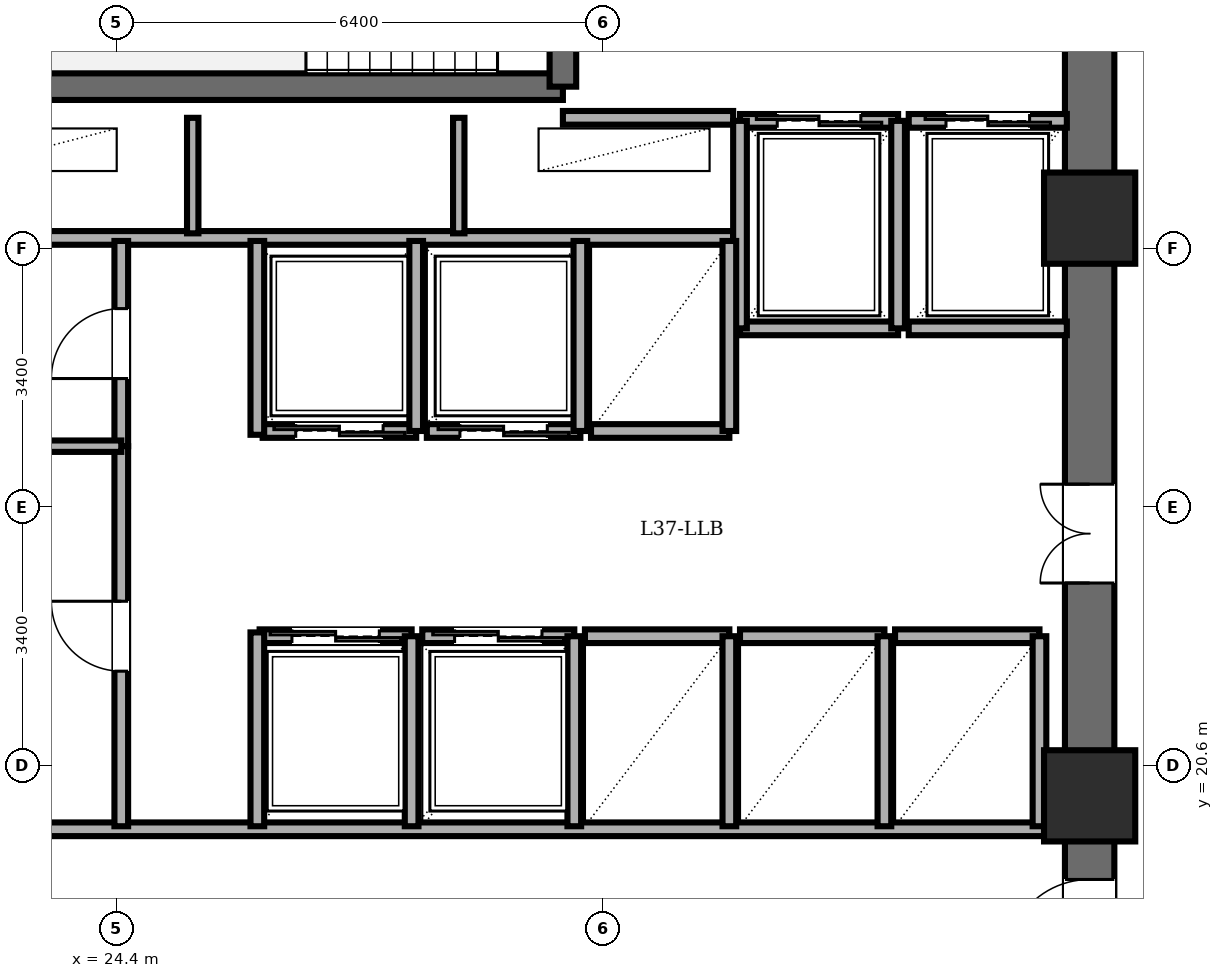
"""IFC4 building model, lengths in metres.
Left out: names, types, materials, properties, quantities, classifications, styles, units other than length and angle.
Written with IfcOpenShell. Run it as: python <this file> out.ifc"""

import sys

from ifc_helpers import new_model, si_unit, direction, frame, frame_2d, origin, origin_2d, place, context, subcontext, project, spatial, rectangle, extrude, element, fill, save


model = new_model("IFC4")
c1 = context("Model", 3, precision=1e-05, world=origin(), true_north=direction((0.0, 1.0)))
c2 = subcontext(c1, "Body", "Model", "MODEL_VIEW")
j1 = project(units=[si_unit("LENGTHUNIT", "METRE"), si_unit("PLANEANGLEUNIT", "RADIAN")], contexts=[c1])
p1 = place(None, origin())
s1 = spatial("IfcSite", under=j1, at=p1, CompositionType="ELEMENT")
p2 = place(p1, origin())
s2 = spatial("IfcBuilding", under=s1, at=p2, CompositionType="ELEMENT")
p3 = place(p2, frame((0.0, 0.0, 143.8)))
s3 = spatial("IfcBuildingStorey", under=s2, at=p3, CompositionType="ELEMENT", Elevation=143.8)
for number, where, z_axis, x_axis in (
    (1, (37.2, 20.2, 0.0), (0.0, 0.0, 1.0), (1.0, 0.0, 0.0)),
    (2, (37.2, 27.8, 0.0), (0.0, 0.0, 1.0), (1.0, 0.0, 0.0)),
):
    element("IfcColumn", number, at=place(p3, frame(where, z_axis=z_axis, x_axis=x_axis)), inside=s3, PredefinedType="COLUMN", context=c2, shape_type="SweptSolid", body=[
        extrude(rectangle(XDim=1.2, YDim=1.2, at=origin_2d()), origin(), (0.0, 0.0, 1.0), 3.6),
    ])
p4 = place(p3, frame((37.2, 14.4, 0.0), z_axis=(0.0, 0.0, 1.0), x_axis=(0.0, 1.0, 0.0)))
e3 = element("IfcWall", 3, at=p4, inside=s3, PredefinedType="SHEAR", context=c2, shape_type="SweptSolid", body=[
    extrude(rectangle(XDim=19.2, YDim=0.65, at=frame_2d((9.6, 0.0))), origin(), (0.0, 0.0, 1.0), 3.4),
])
p5 = place(p4, frame((15.8, 0.0, 0.0)))
e4 = element("IfcOpeningElement", 4, at=p5, cuts=e3, PredefinedType="OPENING", context=c2, shape_type="SweptSolid", body=[
    extrude(rectangle(XDim=1.15, YDim=2.15, at=frame_2d((0.575, 1.075))), frame((0.0, 0.335, 0.0), z_axis=(0.0, -1.0, 0.0), x_axis=(1.0, 0.0, 0.0)), (0.0, 0.0, 1.0), 0.67),
])
p6 = place(p4, frame((3.6, 0.0, 0.0)))
e5 = element("IfcOpeningElement", 5, at=p6, cuts=e3, PredefinedType="OPENING", context=c2, shape_type="SweptSolid", body=[
    extrude(rectangle(XDim=1.1, YDim=2.15, at=frame_2d((0.55, 1.075))), frame((0.0, 0.335, 0.0), z_axis=(0.0, -1.0, 0.0), x_axis=(1.0, 0.0, 0.0)), (0.0, 0.0, 1.0), 0.67),
])
p7 = place(p4, frame((8.6, 0.0, 0.0)))
e6 = element("IfcOpeningElement", 6, at=p7, cuts=e3, PredefinedType="OPENING", context=c2, shape_type="SweptSolid", body=[
    extrude(rectangle(XDim=1.3, YDim=2.2, at=frame_2d((0.65, 1.1))), frame((0.0, 0.335, 0.0), z_axis=(0.0, -1.0, 0.0), x_axis=(1.0, 0.0, 0.0)), (0.0, 0.0, 1.0), 0.67),
])
p8 = place(p3, frame((22.48, 29.53, 0.0), z_axis=(0.0, 0.0, 1.0), x_axis=(1.0, 0.0, 0.0)))
e7 = element("IfcWall", 7, at=p8, inside=s3, PredefinedType="SOLIDWALL", context=c2, shape_type="SweptSolid", body=[
    extrude(rectangle(XDim=7.79, YDim=0.35, at=frame_2d((3.895, 0.0))), origin(), (0.0, 0.0, 1.0), 3.4),
])
p9 = place(p3, frame((30.27, 29.53, 0.0), z_axis=(0.0, 0.0, 1.0), x_axis=(0.0, 1.0, 0.0)))
e8 = element("IfcWall", 8, at=p9, inside=s3, PredefinedType="SOLIDWALL", context=c2, shape_type="SweptSolid", body=[
    extrude(rectangle(XDim=3.58, YDim=0.35, at=frame_2d((1.79, 0.0))), origin(), (0.0, 0.0, 1.0), 3.4),
])
p10 = place(p9, frame((1.25, 0.0, 0.0)))
e9 = element("IfcOpeningElement", 9, at=p10, cuts=e8, PredefinedType="OPENING", context=c2, shape_type="SweptSolid", body=[
    extrude(rectangle(XDim=1.1, YDim=2.15, at=frame_2d((0.55, 1.075))), frame((0.0, 0.185, 0.0), z_axis=(0.0, -1.0, 0.0), x_axis=(1.0, 0.0, 0.0)), (0.0, 0.0, 1.0), 0.37),
])
p11 = place(p3, frame((30.27, 29.12, 0.0), z_axis=(0.0, 0.0, 1.0), x_axis=(1.0, 0.0, 0.0)))
e10 = element("IfcWall", 10, at=p11, inside=s3, PredefinedType="PARTITIONING", context=c2, shape_type="SweptSolid", body=[
    extrude(rectangle(XDim=2.24, YDim=0.18, at=frame_2d((1.12, 0.0))), origin(), (0.0, 0.0, 1.0), 3.4),
])
p12 = place(p3, frame((21.95, 27.54, 0.0), z_axis=(0.0, 0.0, 1.0), x_axis=(1.0, 0.0, 0.0)))
e11 = element("IfcWall", 11, at=p12, inside=s3, PredefinedType="PARTITIONING", context=c2, shape_type="SweptSolid", body=[
    extrude(rectangle(XDim=10.56, YDim=0.18, at=frame_2d((5.28, 0.0))), origin(), (0.0, 0.0, 1.0), 3.4),
])
for number, where, z_axis, x_axis in (
    (12, (25.4, 27.6, 0.0), (0.0, 0.0, 1.0), (0.0, 1.0, 0.0)),
    (13, (28.9, 27.6, 0.0), (0.0, 0.0, 1.0), (0.0, 1.0, 0.0)),
):
    element("IfcWall", number, at=place(p3, frame(where, z_axis=z_axis, x_axis=x_axis)), inside=s3, PredefinedType="PARTITIONING", context=c2, shape_type="SweptSolid", body=[
        extrude(rectangle(XDim=1.52, YDim=0.15, at=frame_2d((0.76, 0.0))), origin(), (0.0, 0.0, 1.0), 3.4),
    ])
p13 = place(p3, frame((21.95, 19.76, 0.0), z_axis=(0.0, 0.0, 1.0), x_axis=(1.0, 0.0, 0.0)))
e14 = element("IfcWall", 14, at=p13, inside=s3, PredefinedType="PARTITIONING", context=c2, shape_type="SweptSolid", body=[
    extrude(rectangle(XDim=14.87, YDim=0.18, at=frame_2d((7.435, 0.0))), origin(), (0.0, 0.0, 1.0), 3.4),
])
p14 = place(p3, frame((32.6, 29.08, 0.0), z_axis=(0.0, 0.0, 1.0), x_axis=(1.0, 0.0, 0.0)))
e15 = element("IfcWall", 15, at=p14, inside=s3, PredefinedType="PARTITIONING", context=c2, shape_type="SweptSolid", body=[
    extrude(rectangle(XDim=2.08, YDim=0.18, at=frame_2d((1.04, 0.0))), origin(), (0.0, 0.0, 1.0), 3.4),
])
p15 = place(p14, frame((0.49, 0.0, 0.0)))
e16 = element("IfcOpeningElement", 16, at=p15, cuts=e15, PredefinedType="OPENING", context=c2, shape_type="SweptSolid", body=[
    extrude(rectangle(XDim=1.1, YDim=2.2, at=frame_2d((0.55, 1.1))), frame((0.0, 0.1, 0.0), z_axis=(0.0, -1.0, 0.0), x_axis=(1.0, 0.0, 0.0)), (0.0, 0.0, 1.0), 0.2),
])
p16 = place(p3, frame((34.68, 26.35, 0.0), z_axis=(0.0, 0.0, 1.0), x_axis=(-1.0, 0.0, 0.0)))
e17 = element("IfcWall", 17, at=p16, inside=s3, PredefinedType="PARTITIONING", context=c2, shape_type="SweptSolid", body=[
    extrude(rectangle(XDim=2.08, YDim=0.18, at=frame_2d((1.04, 0.0))), origin(), (0.0, 0.0, 1.0), 3.4),
])
for number, where, z_axis, x_axis in (
    (18, (34.68, 26.35, 0.0), (0.0, 0.0, 1.0), (0.0, 1.0, 0.0)),
    (19, (32.6, 29.08, 0.0), (0.0, 0.0, 1.0), (0.0, -1.0, 0.0)),
):
    element("IfcWall", number, at=place(p3, frame(where, z_axis=z_axis, x_axis=x_axis)), inside=s3, PredefinedType="PARTITIONING", context=c2, shape_type="SweptSolid", body=[
        extrude(rectangle(XDim=2.73, YDim=0.18, at=frame_2d((1.365, 0.0))), origin(), (0.0, 0.0, 1.0), 3.4),
    ])
p17 = place(p3, frame((34.82, 29.08, 0.0), z_axis=(0.0, 0.0, 1.0), x_axis=(1.0, 0.0, 0.0)))
e20 = element("IfcWall", 20, at=p17, inside=s3, PredefinedType="PARTITIONING", context=c2, shape_type="SweptSolid", body=[
    extrude(rectangle(XDim=2.08, YDim=0.18, at=frame_2d((1.04, 0.0))), origin(), (0.0, 0.0, 1.0), 3.4),
])
p18 = place(p17, frame((0.49, 0.0, 0.0)))
e21 = element("IfcOpeningElement", 21, at=p18, cuts=e20, PredefinedType="OPENING", context=c2, shape_type="SweptSolid", body=[
    extrude(rectangle(XDim=1.1, YDim=2.2, at=frame_2d((0.55, 1.1))), frame((0.0, 0.1, 0.0), z_axis=(0.0, -1.0, 0.0), x_axis=(1.0, 0.0, 0.0)), (0.0, 0.0, 1.0), 0.2),
])
p19 = place(p3, frame((36.9, 26.35, 0.0), z_axis=(0.0, 0.0, 1.0), x_axis=(-1.0, 0.0, 0.0)))
e22 = element("IfcWall", 22, at=p19, inside=s3, PredefinedType="PARTITIONING", context=c2, shape_type="SweptSolid", body=[
    extrude(rectangle(XDim=2.08, YDim=0.18, at=frame_2d((1.04, 0.0))), origin(), (0.0, 0.0, 1.0), 3.4),
])
p20 = place(p3, frame((28.34, 25.0, 0.0), z_axis=(0.0, 0.0, 1.0), x_axis=(-1.0, 0.0, 0.0)))
e23 = element("IfcWall", 23, at=p20, inside=s3, PredefinedType="PARTITIONING", context=c2, shape_type="SweptSolid", body=[
    extrude(rectangle(XDim=2.02, YDim=0.18, at=frame_2d((1.01, 0.0))), origin(), (0.0, 0.0, 1.0), 3.4),
])
p21 = place(p20, frame((0.435, 0.0, 0.0)))
e24 = element("IfcOpeningElement", 24, at=p21, cuts=e23, PredefinedType="OPENING", context=c2, shape_type="SweptSolid", body=[
    extrude(rectangle(XDim=1.15, YDim=2.2, at=frame_2d((0.575, 1.1))), frame((0.0, 0.1, 0.0), z_axis=(0.0, -1.0, 0.0), x_axis=(1.0, 0.0, 0.0)), (0.0, 0.0, 1.0), 0.2),
])
p22 = place(p3, frame((28.34, 25.0, 0.0), z_axis=(0.0, 0.0, 1.0), x_axis=(0.0, 1.0, 0.0)))
e25 = element("IfcWall", 25, at=p22, inside=s3, PredefinedType="PARTITIONING", context=c2, shape_type="SweptSolid", body=[
    extrude(rectangle(XDim=2.5, YDim=0.18, at=frame_2d((1.25, 0.0))), origin(), (0.0, 0.0, 1.0), 3.4),
])
p23 = place(p3, frame((30.5, 25.0, 0.0), z_axis=(0.0, 0.0, 1.0), x_axis=(-1.0, 0.0, 0.0)))
e26 = element("IfcWall", 26, at=p23, inside=s3, PredefinedType="PARTITIONING", context=c2, shape_type="SweptSolid", body=[
    extrude(rectangle(XDim=2.02, YDim=0.18, at=frame_2d((1.01, 0.0))), origin(), (0.0, 0.0, 1.0), 3.4),
])
p24 = place(p23, frame((0.435, 0.0, 0.0)))
e27 = element("IfcOpeningElement", 27, at=p24, cuts=e26, PredefinedType="OPENING", context=c2, shape_type="SweptSolid", body=[
    extrude(rectangle(XDim=1.15, YDim=2.2, at=frame_2d((0.575, 1.1))), frame((0.0, 0.1, 0.0), z_axis=(0.0, -1.0, 0.0), x_axis=(1.0, 0.0, 0.0)), (0.0, 0.0, 1.0), 0.2),
])
p25 = place(p3, frame((30.5, 25.0, 0.0), z_axis=(0.0, 0.0, 1.0), x_axis=(0.0, 1.0, 0.0)))
e28 = element("IfcWall", 28, at=p25, inside=s3, PredefinedType="PARTITIONING", context=c2, shape_type="SweptSolid", body=[
    extrude(rectangle(XDim=2.5, YDim=0.18, at=frame_2d((1.25, 0.0))), origin(), (0.0, 0.0, 1.0), 3.4),
])
p26 = place(p3, frame((26.28, 22.3, 0.0), z_axis=(0.0, 0.0, 1.0), x_axis=(1.0, 0.0, 0.0)))
e29 = element("IfcWall", 29, at=p26, inside=s3, PredefinedType="PARTITIONING", context=c2, shape_type="SweptSolid", body=[
    extrude(rectangle(XDim=2.0, YDim=0.18, at=frame_2d((1.0, 0.0))), origin(), (0.0, 0.0, 1.0), 3.4),
])
p27 = place(p26, frame((0.425, 0.0, 0.0)))
e30 = element("IfcOpeningElement", 30, at=p27, cuts=e29, PredefinedType="OPENING", context=c2, shape_type="SweptSolid", body=[
    extrude(rectangle(XDim=1.15, YDim=2.2, at=frame_2d((0.575, 1.1))), frame((0.0, 0.1, 0.0), z_axis=(0.0, -1.0, 0.0), x_axis=(1.0, 0.0, 0.0)), (0.0, 0.0, 1.0), 0.2),
])
p28 = place(p3, frame((28.28, 19.8, 0.0), z_axis=(0.0, 0.0, 1.0), x_axis=(0.0, 1.0, 0.0)))
e31 = element("IfcWall", 31, at=p28, inside=s3, PredefinedType="PARTITIONING", context=c2, shape_type="SweptSolid", body=[
    extrude(rectangle(XDim=2.5, YDim=0.18, at=frame_2d((1.25, 0.0))), origin(), (0.0, 0.0, 1.0), 3.4),
])
p29 = place(p3, frame((28.42, 22.3, 0.0), z_axis=(0.0, 0.0, 1.0), x_axis=(1.0, 0.0, 0.0)))
e32 = element("IfcWall", 32, at=p29, inside=s3, PredefinedType="PARTITIONING", context=c2, shape_type="SweptSolid", body=[
    extrude(rectangle(XDim=2.0, YDim=0.18, at=frame_2d((1.0, 0.0))), origin(), (0.0, 0.0, 1.0), 3.4),
])
p30 = place(p29, frame((0.425, 0.0, 0.0)))
e33 = element("IfcOpeningElement", 33, at=p30, cuts=e32, PredefinedType="OPENING", context=c2, shape_type="SweptSolid", body=[
    extrude(rectangle(XDim=1.15, YDim=2.2, at=frame_2d((0.575, 1.1))), frame((0.0, 0.1, 0.0), z_axis=(0.0, -1.0, 0.0), x_axis=(1.0, 0.0, 0.0)), (0.0, 0.0, 1.0), 0.2),
])
p31 = place(p3, frame((30.42, 19.8, 0.0), z_axis=(0.0, 0.0, 1.0), x_axis=(0.0, 1.0, 0.0)))
e34 = element("IfcWall", 34, at=p31, inside=s3, PredefinedType="PARTITIONING", context=c2, shape_type="SweptSolid", body=[
    extrude(rectangle(XDim=2.5, YDim=0.18, at=frame_2d((1.25, 0.0))), origin(), (0.0, 0.0, 1.0), 3.4),
])
p32 = place(p3, frame((32.46, 25.0, 0.0), z_axis=(0.0, 0.0, 1.0), x_axis=(-1.0, 0.0, 0.0)))
e35 = element("IfcWall", 35, at=p32, inside=s3, PredefinedType="PARTITIONING", context=c2, shape_type="SweptSolid", body=[
    extrude(rectangle(XDim=1.82, YDim=0.18, at=frame_2d((0.91, 0.0))), origin(), (0.0, 0.0, 1.0), 3.4),
])
p33 = place(p3, frame((32.46, 25.0, 0.0), z_axis=(0.0, 0.0, 1.0), x_axis=(0.0, 1.0, 0.0)))
e36 = element("IfcWall", 36, at=p33, inside=s3, PredefinedType="PARTITIONING", context=c2, shape_type="SweptSolid", body=[
    extrude(rectangle(XDim=2.5, YDim=0.18, at=frame_2d((1.25, 0.0))), origin(), (0.0, 0.0, 1.0), 3.4),
])
p34 = place(p3, frame((30.56, 22.3, 0.0), z_axis=(0.0, 0.0, 1.0), x_axis=(1.0, 0.0, 0.0)))
e37 = element("IfcWall", 37, at=p34, inside=s3, PredefinedType="PARTITIONING", context=c2, shape_type="SweptSolid", body=[
    extrude(rectangle(XDim=1.9, YDim=0.18, at=frame_2d((0.95, 0.0))), origin(), (0.0, 0.0, 1.0), 3.4),
])
p35 = place(p3, frame((32.46, 19.8, 0.0), z_axis=(0.0, 0.0, 1.0), x_axis=(0.0, 1.0, 0.0)))
e38 = element("IfcWall", 38, at=p35, inside=s3, PredefinedType="PARTITIONING", context=c2, shape_type="SweptSolid", body=[
    extrude(rectangle(XDim=2.5, YDim=0.18, at=frame_2d((1.25, 0.0))), origin(), (0.0, 0.0, 1.0), 3.4),
])
p36 = place(p3, frame((32.6, 22.3, 0.0), z_axis=(0.0, 0.0, 1.0), x_axis=(1.0, 0.0, 0.0)))
e39 = element("IfcWall", 39, at=p36, inside=s3, PredefinedType="PARTITIONING", context=c2, shape_type="SweptSolid", body=[
    extrude(rectangle(XDim=1.9, YDim=0.18, at=frame_2d((0.95, 0.0))), origin(), (0.0, 0.0, 1.0), 3.4),
])
p37 = place(p3, frame((34.5, 19.8, 0.0), z_axis=(0.0, 0.0, 1.0), x_axis=(0.0, 1.0, 0.0)))
e40 = element("IfcWall", 40, at=p37, inside=s3, PredefinedType="PARTITIONING", context=c2, shape_type="SweptSolid", body=[
    extrude(rectangle(XDim=2.5, YDim=0.18, at=frame_2d((1.25, 0.0))), origin(), (0.0, 0.0, 1.0), 3.4),
])
p38 = place(p3, frame((34.64, 22.3, 0.0), z_axis=(0.0, 0.0, 1.0), x_axis=(1.0, 0.0, 0.0)))
e41 = element("IfcWall", 41, at=p38, inside=s3, PredefinedType="PARTITIONING", context=c2, shape_type="SweptSolid", body=[
    extrude(rectangle(XDim=1.9, YDim=0.18, at=frame_2d((0.95, 0.0))), origin(), (0.0, 0.0, 1.0), 3.4),
])
p39 = place(p3, frame((36.54, 19.8, 0.0), z_axis=(0.0, 0.0, 1.0), x_axis=(0.0, 1.0, 0.0)))
e42 = element("IfcWall", 42, at=p39, inside=s3, PredefinedType="PARTITIONING", context=c2, shape_type="SweptSolid", body=[
    extrude(rectangle(XDim=2.5, YDim=0.18, at=frame_2d((1.25, 0.0))), origin(), (0.0, 0.0, 1.0), 3.4),
])
p40 = place(p3, frame((24.46, 24.8, 0.0), z_axis=(0.0, 0.0, 1.0), x_axis=(0.0, 1.0, 0.0)))
e43 = element("IfcWall", 43, at=p40, inside=s3, PredefinedType="PARTITIONING", context=c2, shape_type="SweptSolid", body=[
    extrude(rectangle(XDim=2.7, YDim=0.18, at=frame_2d((1.35, 0.0))), origin(), (0.0, 0.0, 1.0), 3.4),
])
p41 = place(p40, frame((0.89, 0.0, 0.0)))
e44 = element("IfcOpeningElement", 44, at=p41, cuts=e43, PredefinedType="OPENING", context=c2, shape_type="SweptSolid", body=[
    extrude(rectangle(XDim=0.92, YDim=2.1, at=frame_2d((0.46, 1.05))), frame((0.0, 0.1, 0.0), z_axis=(0.0, -1.0, 0.0), x_axis=(1.0, 0.0, 0.0)), (0.0, 0.0, 1.0), 0.2),
])
p42 = place(p3, frame((24.46, 19.8, 0.0), z_axis=(0.0, 0.0, 1.0), x_axis=(0.0, 1.0, 0.0)))
e45 = element("IfcWall", 45, at=p42, inside=s3, PredefinedType="PARTITIONING", context=c2, shape_type="SweptSolid", body=[
    extrude(rectangle(XDim=5.0, YDim=0.18, at=frame_2d((2.5, 0.0))), origin(), (0.0, 0.0, 1.0), 3.4),
])
p43 = place(p42, frame((2.04, 0.0, 0.0)))
e46 = element("IfcOpeningElement", 46, at=p43, cuts=e45, PredefinedType="OPENING", context=c2, shape_type="SweptSolid", body=[
    extrude(rectangle(XDim=0.92, YDim=2.1, at=frame_2d((0.46, 1.05))), frame((0.0, 0.1, 0.0), z_axis=(0.0, -1.0, 0.0), x_axis=(1.0, 0.0, 0.0)), (0.0, 0.0, 1.0), 0.2),
])
p44 = place(p3, frame((21.95, 24.8, 0.0), z_axis=(0.0, 0.0, 1.0), x_axis=(1.0, 0.0, 0.0)))
e47 = element("IfcWall", 47, at=p44, inside=s3, PredefinedType="PARTITIONING", context=c2, shape_type="SweptSolid", body=[
    extrude(rectangle(XDim=2.51, YDim=0.15, at=frame_2d((1.255, 0.0))), origin(), (0.0, 0.0, 1.0), 3.4),
])
for number, where, z_axis, x_axis in (
    (48, (26.25, 24.95, 0.0), (0.0, 0.0, 1.0), (0.0, 1.0, 0.0)),
    (49, (26.25, 19.8, 0.0), (0.0, 0.0, 1.0), (0.0, 1.0, 0.0)),
):
    element("IfcWall", number, at=place(p3, frame(where, z_axis=z_axis, x_axis=x_axis)), inside=s3, PredefinedType="PARTITIONING", context=c2, shape_type="SweptSolid", body=[
        extrude(rectangle(XDim=2.55, YDim=0.18, at=frame_2d((1.275, 0.0))), origin(), (0.0, 0.0, 1.0), 3.4),
    ])
p45 = place(p6, origin())
e50 = element("IfcDoor", 50, at=p45, inside=s3, OperationType="SINGLE_SWING_LEFT", PredefinedType="DOOR", context=c2, shape_type="SweptSolid", body=[
    extrude(rectangle(XDim=1.1, YDim=2.15, at=frame_2d((0.55, 1.075))), frame((0.0, 0.025, 0.0), z_axis=(0.0, -1.0, 0.0), x_axis=(1.0, 0.0, 0.0)), (0.0, 0.0, 1.0), 0.05),
])
fill(e5, e50)
p46 = place(p15, origin())
e51 = element("IfcDoor", 51, at=p46, inside=s3, OperationType="DOUBLE_DOOR_SLIDING", PredefinedType="DOOR", context=c2, shape_type="SweptSolid", body=[
    extrude(rectangle(XDim=1.1, YDim=2.2, at=frame_2d((0.55, 1.1))), frame((0.0, 0.025, 0.0), z_axis=(0.0, -1.0, 0.0), x_axis=(1.0, 0.0, 0.0)), (0.0, 0.0, 1.0), 0.05),
])
fill(e16, e51)
p47 = place(p18, origin())
e52 = element("IfcDoor", 52, at=p47, inside=s3, OperationType="DOUBLE_DOOR_SLIDING", PredefinedType="DOOR", context=c2, shape_type="SweptSolid", body=[
    extrude(rectangle(XDim=1.1, YDim=2.2, at=frame_2d((0.55, 1.1))), frame((0.0, 0.025, 0.0), z_axis=(0.0, -1.0, 0.0), x_axis=(1.0, 0.0, 0.0)), (0.0, 0.0, 1.0), 0.05),
])
fill(e21, e52)
p48 = place(p21, origin())
e53 = element("IfcDoor", 53, at=p48, inside=s3, OperationType="DOUBLE_DOOR_SLIDING", PredefinedType="DOOR", context=c2, shape_type="SweptSolid", body=[
    extrude(rectangle(XDim=1.15, YDim=2.2, at=frame_2d((0.575, 1.1))), frame((0.0, 0.025, 0.0), z_axis=(0.0, -1.0, 0.0), x_axis=(1.0, 0.0, 0.0)), (0.0, 0.0, 1.0), 0.05),
])
fill(e24, e53)
p49 = place(p24, origin())
e54 = element("IfcDoor", 54, at=p49, inside=s3, OperationType="DOUBLE_DOOR_SLIDING", PredefinedType="DOOR", context=c2, shape_type="SweptSolid", body=[
    extrude(rectangle(XDim=1.15, YDim=2.2, at=frame_2d((0.575, 1.1))), frame((0.0, 0.025, 0.0), z_axis=(0.0, -1.0, 0.0), x_axis=(1.0, 0.0, 0.0)), (0.0, 0.0, 1.0), 0.05),
])
fill(e27, e54)
p50 = place(p27, origin())
e55 = element("IfcDoor", 55, at=p50, inside=s3, OperationType="DOUBLE_DOOR_SLIDING", PredefinedType="DOOR", context=c2, shape_type="SweptSolid", body=[
    extrude(rectangle(XDim=1.15, YDim=2.2, at=frame_2d((0.575, 1.1))), frame((0.0, 0.025, 0.0), z_axis=(0.0, -1.0, 0.0), x_axis=(1.0, 0.0, 0.0)), (0.0, 0.0, 1.0), 0.05),
])
fill(e30, e55)
p51 = place(p30, origin())
e56 = element("IfcDoor", 56, at=p51, inside=s3, OperationType="DOUBLE_DOOR_SLIDING", PredefinedType="DOOR", context=c2, shape_type="SweptSolid", body=[
    extrude(rectangle(XDim=1.15, YDim=2.2, at=frame_2d((0.575, 1.1))), frame((0.0, 0.025, 0.0), z_axis=(0.0, -1.0, 0.0), x_axis=(1.0, 0.0, 0.0)), (0.0, 0.0, 1.0), 0.05),
])
fill(e33, e56)
p52 = place(p41, origin())
e57 = element("IfcDoor", 57, at=p52, inside=s3, OperationType="SINGLE_SWING_LEFT", PredefinedType="DOOR", context=c2, shape_type="SweptSolid", body=[
    extrude(rectangle(XDim=0.92, YDim=2.1, at=frame_2d((0.46, 1.05))), frame((0.0, 0.025, 0.0), z_axis=(0.0, -1.0, 0.0), x_axis=(1.0, 0.0, 0.0)), (0.0, 0.0, 1.0), 0.05),
])
fill(e44, e57)
p53 = place(p43, origin())
e58 = element("IfcDoor", 58, at=p53, inside=s3, OperationType="SINGLE_SWING_RIGHT", PredefinedType="DOOR", context=c2, shape_type="SweptSolid", body=[
    extrude(rectangle(XDim=0.92, YDim=2.1, at=frame_2d((0.46, 1.05))), frame((0.0, 0.025, 0.0), z_axis=(0.0, -1.0, 0.0), x_axis=(1.0, 0.0, 0.0)), (0.0, 0.0, 1.0), 0.05),
])
fill(e46, e58)
p54 = place(p7, origin())
e59 = element("IfcDoor", 59, at=p54, inside=s3, OperationType="DOUBLE_DOOR_SINGLE_SWING", PredefinedType="DOOR", context=c2, shape_type="SweptSolid", body=[
    extrude(rectangle(XDim=1.3, YDim=2.2, at=frame_2d((0.65, 1.1))), frame((0.0, 0.025, 0.0), z_axis=(0.0, -1.0, 0.0), x_axis=(1.0, 0.0, 0.0)), (0.0, 0.0, 1.0), 0.05),
])
fill(e6, e59)
save(model, sys.argv[1])
